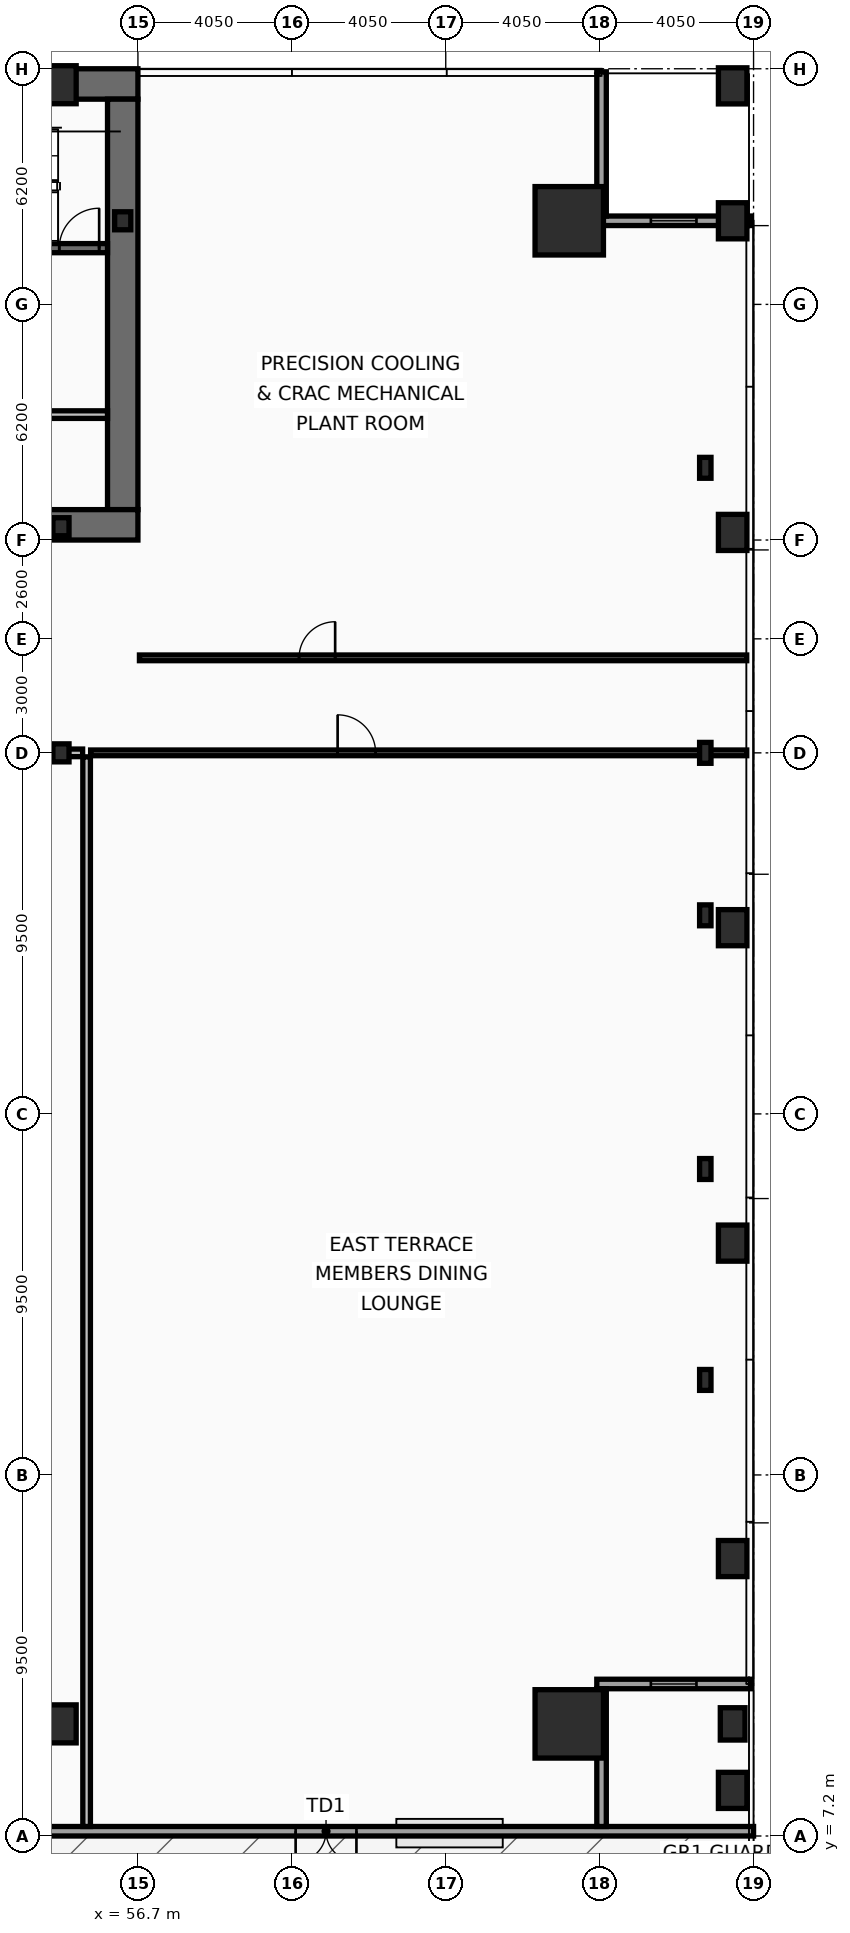
"""IFC4 building model, lengths in metres.
Left out: names, types, materials, properties, quantities, classifications, styles, units other than length and angle.
Written with IfcOpenShell. Run it as: python <this file> out.ifc"""

import sys

from ifc_helpers import new_model, si_unit, direction, frame, frame_2d, origin, origin_2d, place, context, subcontext, project, spatial, rectangle, hollow_rectangle, i_section, extrude, element, fill, save


model = new_model("IFC4")
c1 = context("Model", 3, precision=1e-05, world=origin(), true_north=direction((0.0, 1.0)))
c2 = subcontext(c1, "Body", "Model", "MODEL_VIEW")
j1 = project(units=[si_unit("LENGTHUNIT", "METRE"), si_unit("PLANEANGLEUNIT", "RADIAN")], contexts=[c1])
p1 = place(None, origin())
s1 = spatial("IfcSite", under=j1, at=p1, CompositionType="ELEMENT")
p2 = place(p1, origin())
s2 = spatial("IfcBuilding", under=s1, at=p2, CompositionType="ELEMENT")
p3 = place(p2, frame((0.0, 0.0, 20.4)))
s3 = spatial("IfcBuildingStorey", under=s2, at=p3, CompositionType="ELEMENT", Elevation=20.4)
p4 = place(p3, frame((16.2, 53.3, 0.0), z_axis=(0.0, 0.0, 1.0), x_axis=(1.0, 0.0, 0.0)))
e1 = element("IfcWall", 1, at=p4, inside=s3, PredefinedType="SHEAR", context=c2, shape_type="SweptSolid", body=[
    extrude(rectangle(XDim=40.5, YDim=0.8, at=frame_2d((20.25, 0.0))), origin(), (0.0, 0.0, 1.0), 5.22),
])
p5 = place(p3, frame((56.3, 52.9, 0.0), z_axis=(0.0, 0.0, 1.0), x_axis=(0.0, -1.0, 0.0)))
e2 = element("IfcWall", 2, at=p5, inside=s3, PredefinedType="SHEAR", context=c2, shape_type="SweptSolid", body=[
    extrude(rectangle(XDim=10.8, YDim=0.8, at=frame_2d((5.4, 0.0))), origin(), (0.0, 0.0, 1.0), 5.22),
])
p6 = place(p3, frame((56.7, 41.7, 0.0), z_axis=(0.0, 0.0, 1.0), x_axis=(-1.0, 0.0, 0.0)))
e3 = element("IfcWall", 3, at=p6, inside=s3, PredefinedType="SHEAR", context=c2, shape_type="SweptSolid", body=[
    extrude(rectangle(XDim=2.45, YDim=0.8, at=frame_2d((1.225, 0.0))), origin(), (0.0, 0.0, 1.0), 5.22),
])
p7 = place(p3, frame((48.63, 48.98, 0.0), z_axis=(0.0, 0.0, 1.0), x_axis=(1.0, 0.0, 0.0)))
e4 = element("IfcWall", 4, at=p7, inside=s3, PredefinedType="SHEAR", context=c2, shape_type="SweptSolid", body=[
    extrude(rectangle(XDim=7.27, YDim=0.24, at=frame_2d((3.635, 0.0))), origin(), (0.0, 0.0, 1.0), 5.22),
])
p8 = place(p7, frame((6.0, 0.0, 0.0)))
e5 = element("IfcOpeningElement", 5, at=p8, cuts=e4, PredefinedType="OPENING", context=c2, shape_type="SweptSolid", body=[
    extrude(rectangle(XDim=1.05, YDim=2.15, at=frame_2d((0.525, 1.075))), frame((0.0, 0.13, 0.0), z_axis=(0.0, -1.0, 0.0), x_axis=(1.0, 0.0, 0.0)), (0.0, 0.0, 1.0), 0.26),
])
for number, where, z_axis, x_axis in (
    (6, (68.05, 10.15, 0.0), (0.0, 0.0, 1.0), (1.0, 0.0, 0.0)),
    (7, (68.05, 49.7, 0.0), (0.0, 0.0, 1.0), (1.0, 0.0, 0.0)),
):
    element("IfcColumn", number, at=place(p3, frame(where, z_axis=z_axis, x_axis=x_axis)), inside=s3, PredefinedType="COLUMN", context=c2, shape_type="SweptSolid", body=[
        extrude(hollow_rectangle(XDim=1.8, YDim=1.8, WallThickness=0.08, at=origin_2d()), origin(), (0.0, 0.0, 1.0), 5.4),
    ])
for number, where, z_axis, x_axis in (
    (8, (54.675, 10.15, 0.0), (0.0, 0.0, 1.0), (1.0, 0.0, 0.0)),
    (9, (54.675, 53.28, 0.0), (0.0, 0.0, 1.0), (1.0, 0.0, 0.0)),
):
    element("IfcColumn", number, at=place(p3, frame(where, z_axis=z_axis, x_axis=x_axis)), inside=s3, PredefinedType="COLUMN", context=c2, shape_type="SweptSolid", body=[
        extrude(hollow_rectangle(XDim=0.8, YDim=1.0, WallThickness=0.055, at=origin_2d()), origin(), (0.0, 0.0, 1.0), 5.4),
    ])
for number, where, z_axis, x_axis in (
    (10, (71.63, 19.2, 0.0), (0.0, 0.0, 1.0), (1.0, 0.0, 0.0)),
    (11, (71.63, 24.75, 0.0), (0.0, 0.0, 1.0), (1.0, 0.0, 0.0)),
    (12, (71.63, 31.425, 0.0), (0.0, 0.0, 1.0), (1.0, 0.0, 0.0)),
    (13, (71.63, 35.7, 0.0), (0.0, 0.0, 1.0), (1.0, 0.0, 0.0)),
    (14, (71.63, 43.2, 0.0), (0.0, 0.0, 1.0), (1.0, 0.0, 0.0)),
):
    element("IfcColumn", number, at=place(p3, frame(where, z_axis=z_axis, x_axis=x_axis)), inside=s3, PredefinedType="COLUMN", context=c2, shape_type="SweptSolid", body=[
        extrude(i_section(OverallWidth=0.3, OverallDepth=0.55, WebThickness=0.015, FlangeThickness=0.029, at=origin_2d()), origin(), (0.0, 0.0, 1.0), 5.4),
    ])
for number, where, z_axis, x_axis in (
    (15, (56.3, 49.7, 0.0), (0.0, 0.0, 1.0), (1.0, 0.0, 0.0)),
    (16, (54.675, 35.7, 0.0), (0.0, 0.0, 1.0), (1.0, 0.0, 0.0)),
    (17, (54.675, 41.65, 0.0), (0.0, 0.0, 1.0), (1.0, 0.0, 0.0)),
):
    element("IfcColumn", number, at=place(p3, frame(where, z_axis=z_axis, x_axis=x_axis)), inside=s3, PredefinedType="COLUMN", context=c2, shape_type="SweptSolid", body=[
        extrude(i_section(OverallWidth=0.424, OverallDepth=0.474, WebThickness=0.048, FlangeThickness=0.077, at=origin_2d()), origin(), (0.0, 0.0, 1.0), 5.4),
    ])
p9 = place(p3, frame((72.35, 8.4, 0.0), z_axis=(0.0, 0.0, 1.0), x_axis=(1.0, 0.0, 0.0)))
e18 = element("IfcColumn", 18, at=p9, inside=s3, PredefinedType="PILASTER", context=c2, shape_type="SweptSolid", body=[
    extrude(rectangle(XDim=0.75, YDim=0.95, at=origin_2d()), origin(), (0.0, 0.0, 1.0), 5.4),
])
p10 = place(p3, frame((72.35, 10.15, 0.0), z_axis=(0.0, 0.0, 1.0), x_axis=(1.0, 0.0, 0.0)))
e19 = element("IfcColumn", 19, at=p10, inside=s3, PredefinedType="PILASTER", context=c2, shape_type="SweptSolid", body=[
    extrude(rectangle(XDim=0.65, YDim=0.85, at=origin_2d()), origin(), (0.0, 0.0, 1.0), 5.4),
])
for number, where, z_axis, x_axis in (
    (20, (72.35, 49.7, 0.0), (0.0, 0.0, 1.0), (1.0, 0.0, 0.0)),
    (21, (72.35, 53.25, 0.0), (0.0, 0.0, 1.0), (1.0, 0.0, 0.0)),
    (22, (72.35, 14.5, 0.0), (0.0, 0.0, 1.0), (1.0, 0.0, 0.0)),
    (23, (72.35, 22.8, 0.0), (0.0, 0.0, 1.0), (1.0, 0.0, 0.0)),
    (24, (72.35, 31.1, 0.0), (0.0, 0.0, 1.0), (1.0, 0.0, 0.0)),
    (25, (72.35, 41.5, 0.0), (0.0, 0.0, 1.0), (1.0, 0.0, 0.0)),
):
    element("IfcColumn", number, at=place(p3, frame(where, z_axis=z_axis, x_axis=x_axis)), inside=s3, PredefinedType="PILASTER", context=c2, shape_type="SweptSolid", body=[
        extrude(rectangle(XDim=0.75, YDim=0.95, at=origin_2d()), origin(), (0.0, 0.0, 1.0), 5.4),
    ])
p11 = place(p3, frame((72.9, 7.325, 0.0), z_axis=(0.0, 0.0, 1.0), x_axis=(-1.0, 0.0, 0.0)))
e26 = element("IfcWall", 26, at=p11, inside=s3, PredefinedType="SOLIDWALL", context=c2, shape_type="SweptSolid", body=[
    extrude(rectangle(XDim=72.9, YDim=0.25, at=frame_2d((36.45, 0.0))), origin(), (0.0, 0.0, 1.0), 4.56),
])
p12 = place(p11, frame((10.45, 0.0, 0.0)))
e27 = element("IfcOpeningElement", 27, at=p12, cuts=e26, PredefinedType="OPENING", context=c2, shape_type="SweptSolid", body=[
    extrude(rectangle(XDim=1.6, YDim=2.2, at=frame_2d((0.8, 1.1))), frame((0.0, 0.135, 0.0), z_axis=(0.0, -1.0, 0.0), x_axis=(1.0, 0.0, 0.0)), (0.0, 0.0, 1.0), 0.27),
])
p13 = place(p11, frame((29.45, 0.0, 0.0)))
e28 = element("IfcOpeningElement", 28, at=p13, cuts=e26, PredefinedType="OPENING", context=c2, shape_type="SweptSolid", body=[
    extrude(rectangle(XDim=1.6, YDim=2.2, at=frame_2d((0.8, 1.1))), frame((0.0, 0.135, 0.0), z_axis=(0.0, -1.0, 0.0), x_axis=(1.0, 0.0, 0.0)), (0.0, 0.0, 1.0), 0.27),
])
p14 = place(p11, frame((60.65, 0.0, 0.0)))
e29 = element("IfcOpeningElement", 29, at=p14, cuts=e26, PredefinedType="OPENING", context=c2, shape_type="SweptSolid", body=[
    extrude(rectangle(XDim=1.05, YDim=2.15, at=frame_2d((0.525, 1.075))), frame((0.0, 0.135, 0.0), z_axis=(0.0, -1.0, 0.0), x_axis=(1.0, 0.0, 0.0)), (0.0, 0.0, 1.0), 0.27),
])
p15 = place(p11, frame((21.05, 0.0, 0.85)))
e30 = element("IfcOpeningElement", 30, at=p15, cuts=e26, PredefinedType="OPENING", context=c2, shape_type="SweptSolid", body=[
    extrude(rectangle(XDim=2.4, YDim=2.6, at=frame_2d((1.2, 1.3))), frame((0.0, 0.135, 0.0), z_axis=(0.0, -1.0, 0.0), x_axis=(1.0, 0.0, 0.0)), (0.0, 0.0, 1.0), 0.27),
])
p16 = place(p11, frame((49.65, 0.0, 0.85)))
e31 = element("IfcOpeningElement", 31, at=p16, cuts=e26, PredefinedType="OPENING", context=c2, shape_type="SweptSolid", body=[
    extrude(rectangle(XDim=2.4, YDim=2.6, at=frame_2d((1.2, 1.3))), frame((0.0, 0.135, 0.0), z_axis=(0.0, -1.0, 0.0), x_axis=(1.0, 0.0, 0.0)), (0.0, 0.0, 1.0), 0.27),
])
p17 = place(p3, frame((68.775, 49.7, 0.0), z_axis=(0.0, 0.0, 1.0), x_axis=(1.0, 0.0, 0.0)))
e32 = element("IfcWall", 32, at=p17, inside=s3, PredefinedType="SOLIDWALL", context=c2, shape_type="SweptSolid", body=[
    extrude(rectangle(XDim=4.045, YDim=0.25, at=frame_2d((2.022, 0.0))), origin(), (0.0, 0.0, 1.0), 3.76),
])
p18 = place(p17, frame((1.423, 0.0, 0.9)))
e33 = element("IfcOpeningElement", 33, at=p18, cuts=e32, PredefinedType="OPENING", context=c2, shape_type="SweptSolid", body=[
    extrude(rectangle(XDim=1.2, YDim=2.8, at=frame_2d((0.6, 1.4))), frame((0.0, 0.135, 0.0), z_axis=(0.0, -1.0, 0.0), x_axis=(1.0, 0.0, 0.0)), (0.0, 0.0, 1.0), 0.27),
])
p19 = place(p3, frame((72.82, 11.2, 0.0), z_axis=(0.0, 0.0, 1.0), x_axis=(-1.0, 0.0, 0.0)))
e34 = element("IfcWall", 34, at=p19, inside=s3, PredefinedType="SOLIDWALL", context=c2, shape_type="SweptSolid", body=[
    extrude(rectangle(XDim=4.045, YDim=0.25, at=frame_2d((2.022, 0.0))), origin(), (0.0, 0.0, 1.0), 3.76),
])
p20 = place(p19, frame((1.423, 0.0, 0.9)))
e35 = element("IfcOpeningElement", 35, at=p20, cuts=e34, PredefinedType="OPENING", context=c2, shape_type="SweptSolid", body=[
    extrude(rectangle(XDim=1.2, YDim=2.8, at=frame_2d((0.6, 1.4))), frame((0.0, 0.135, 0.0), z_axis=(0.0, -1.0, 0.0), x_axis=(1.0, 0.0, 0.0)), (0.0, 0.0, 1.0), 0.27),
])
p21 = place(p3, frame((68.9, 53.62, 0.0), z_axis=(0.0, 0.0, 1.0), x_axis=(0.0, -1.0, 0.0)))
e36 = element("IfcWall", 36, at=p21, inside=s3, PredefinedType="SOLIDWALL", context=c2, shape_type="SweptSolid", body=[
    extrude(rectangle(XDim=3.795, YDim=0.25, at=frame_2d((1.897, 0.0))), origin(), (0.0, 0.0, 1.0), 3.76),
])
p22 = place(p3, frame((68.9, 11.075, 0.0), z_axis=(0.0, 0.0, 1.0), x_axis=(0.0, -1.0, 0.0)))
e37 = element("IfcWall", 37, at=p22, inside=s3, PredefinedType="SOLIDWALL", context=c2, shape_type="SweptSolid", body=[
    extrude(rectangle(XDim=3.625, YDim=0.25, at=frame_2d((1.812, 0.0))), origin(), (0.0, 0.0, 1.0), 3.76),
])
p23 = place(p3, frame((51.9, 44.6, 0.0), z_axis=(0.0, 0.0, 1.0), x_axis=(1.0, 0.0, 0.0)))
e38 = element("IfcWall", 38, at=p23, inside=s3, PredefinedType="PARTITIONING", context=c2, shape_type="SweptSolid", body=[
    extrude(rectangle(XDim=4.0, YDim=0.2, at=frame_2d((2.0, 0.0))), origin(), (0.0, 0.0, 1.0), 5.22),
])
p24 = place(p23, frame((1.15, 0.0, 0.0)))
e39 = element("IfcOpeningElement", 39, at=p24, cuts=e38, PredefinedType="OPENING", context=c2, shape_type="SweptSolid", body=[
    extrude(rectangle(XDim=1.05, YDim=2.15, at=frame_2d((0.525, 1.075))), frame((0.0, 0.11, 0.0), z_axis=(0.0, -1.0, 0.0), x_axis=(1.0, 0.0, 0.0)), (0.0, 0.0, 1.0), 0.22),
])
p25 = place(p3, frame((54.105, 35.7, 0.0), z_axis=(0.0, 0.0, 1.0), x_axis=(1.0, 0.0, 0.0)))
e40 = element("IfcWall", 40, at=p25, inside=s3, PredefinedType="PARTITIONING", context=c2, shape_type="SweptSolid", body=[
    extrude(rectangle(XDim=1.14, YDim=0.2, at=frame_2d((0.57, 0.0))), origin(), (0.0, 0.0, 1.0), 2.21),
])
p26 = place(p3, frame((55.455, 35.7, 0.0), z_axis=(0.0, 0.0, 1.0), x_axis=(1.0, 0.0, 0.0)))
e41 = element("IfcWall", 41, at=p26, inside=s3, PredefinedType="PARTITIONING", context=c2, shape_type="SweptSolid", body=[
    extrude(rectangle(XDim=17.265, YDim=0.15, at=frame_2d((8.632, 0.0))), origin(), (0.0, 0.0, 1.0), 4.41),
])
p27 = place(p26, frame((6.5, 0.0, 0.0)))
e42 = element("IfcOpeningElement", 42, at=p27, cuts=e41, PredefinedType="OPENING", context=c2, shape_type="SweptSolid", body=[
    extrude(rectangle(XDim=1.0, YDim=2.05, at=frame_2d((0.5, 1.025))), frame((0.0, 0.085, 0.0), z_axis=(0.0, -1.0, 0.0), x_axis=(1.0, 0.0, 0.0)), (0.0, 0.0, 1.0), 0.17),
])
p28 = place(p3, frame((55.35, 7.45, 0.0), z_axis=(0.0, 0.0, 1.0), x_axis=(0.0, 1.0, 0.0)))
e43 = element("IfcWall", 43, at=p28, inside=s3, PredefinedType="PARTITIONING", context=c2, shape_type="SweptSolid", body=[
    extrude(rectangle(XDim=28.145, YDim=0.2, at=frame_2d((14.073, 0.0))), origin(), (0.0, 0.0, 1.0), 3.89),
])
p29 = place(p3, frame((56.74, 38.2, 0.0), z_axis=(0.0, 0.0, 1.0), x_axis=(1.0, 0.0, 0.0)))
e44 = element("IfcWall", 44, at=p29, inside=s3, PredefinedType="PARTITIONING", context=c2, shape_type="SweptSolid", body=[
    extrude(rectangle(XDim=15.98, YDim=0.15, at=frame_2d((7.99, 0.0))), origin(), (0.0, 0.0, 1.0), 4.56),
])
p30 = place(p29, frame((4.2, 0.0, 0.0)))
e45 = element("IfcOpeningElement", 45, at=p30, cuts=e44, PredefinedType="OPENING", context=c2, shape_type="SweptSolid", body=[
    extrude(rectangle(XDim=0.95, YDim=2.1, at=frame_2d((0.475, 1.05))), frame((0.0, 0.085, 0.0), z_axis=(0.0, -1.0, 0.0), x_axis=(1.0, 0.0, 0.0)), (0.0, 0.0, 1.0), 0.17),
])
p31 = place(p12, origin())
e46 = element("IfcDoor", 46, at=p31, inside=s3, OperationType="DOUBLE_DOOR_SINGLE_SWING", PredefinedType="DOOR", context=c2, shape_type="SweptSolid", body=[
    extrude(rectangle(XDim=1.6, YDim=2.2, at=frame_2d((0.8, 1.1))), frame((0.0, 0.025, 0.0), z_axis=(0.0, -1.0, 0.0), x_axis=(1.0, 0.0, 0.0)), (0.0, 0.0, 1.0), 0.05),
])
fill(e27, e46)
p32 = place(p18, origin())
e47 = element("IfcWindow", 47, at=p32, inside=s3, PartitioningType="SINGLE_PANEL", PredefinedType="WINDOW", context=c2, shape_type="SweptSolid", body=[
    extrude(rectangle(XDim=1.2, YDim=2.8, at=frame_2d((0.6, 1.4))), frame((0.0, 0.03, 0.0), z_axis=(0.0, -1.0, 0.0), x_axis=(1.0, 0.0, 0.0)), (0.0, 0.0, 1.0), 0.06),
])
fill(e33, e47)
p33 = place(p20, origin())
e48 = element("IfcWindow", 48, at=p33, inside=s3, PartitioningType="SINGLE_PANEL", PredefinedType="WINDOW", context=c2, shape_type="SweptSolid", body=[
    extrude(rectangle(XDim=1.2, YDim=2.8, at=frame_2d((0.6, 1.4))), frame((0.0, 0.03, 0.0), z_axis=(0.0, -1.0, 0.0), x_axis=(1.0, 0.0, 0.0)), (0.0, 0.0, 1.0), 0.06),
])
fill(e35, e48)
p34 = place(p8, origin())
e49 = element("IfcDoor", 49, at=p34, inside=s3, OperationType="SINGLE_SWING_RIGHT", PredefinedType="DOOR", context=c2, shape_type="SweptSolid", body=[
    extrude(rectangle(XDim=1.05, YDim=2.15, at=frame_2d((0.525, 1.075))), frame((0.0, 0.025, 0.0), z_axis=(0.0, -1.0, 0.0), x_axis=(1.0, 0.0, 0.0)), (0.0, 0.0, 1.0), 0.05),
])
fill(e5, e49)
p35 = place(p27, origin())
e50 = element("IfcDoor", 50, at=p35, inside=s3, OperationType="SINGLE_SWING_LEFT", PredefinedType="DOOR", context=c2, shape_type="SweptSolid", body=[
    extrude(rectangle(XDim=1.0, YDim=2.05, at=frame_2d((0.5, 1.025))), frame((0.0, 0.025, 0.0), z_axis=(0.0, -1.0, 0.0), x_axis=(1.0, 0.0, 0.0)), (0.0, 0.0, 1.0), 0.05),
])
fill(e42, e50)
p36 = place(p30, origin())
e51 = element("IfcDoor", 51, at=p36, inside=s3, OperationType="SINGLE_SWING_RIGHT", PredefinedType="DOOR", context=c2, shape_type="SweptSolid", body=[
    extrude(rectangle(XDim=0.95, YDim=2.1, at=frame_2d((0.475, 1.05))), frame((0.0, 0.025, 0.0), z_axis=(0.0, -1.0, 0.0), x_axis=(1.0, 0.0, 0.0)), (0.0, 0.0, 1.0), 0.05),
])
fill(e45, e51)
save(model, sys.argv[1])
